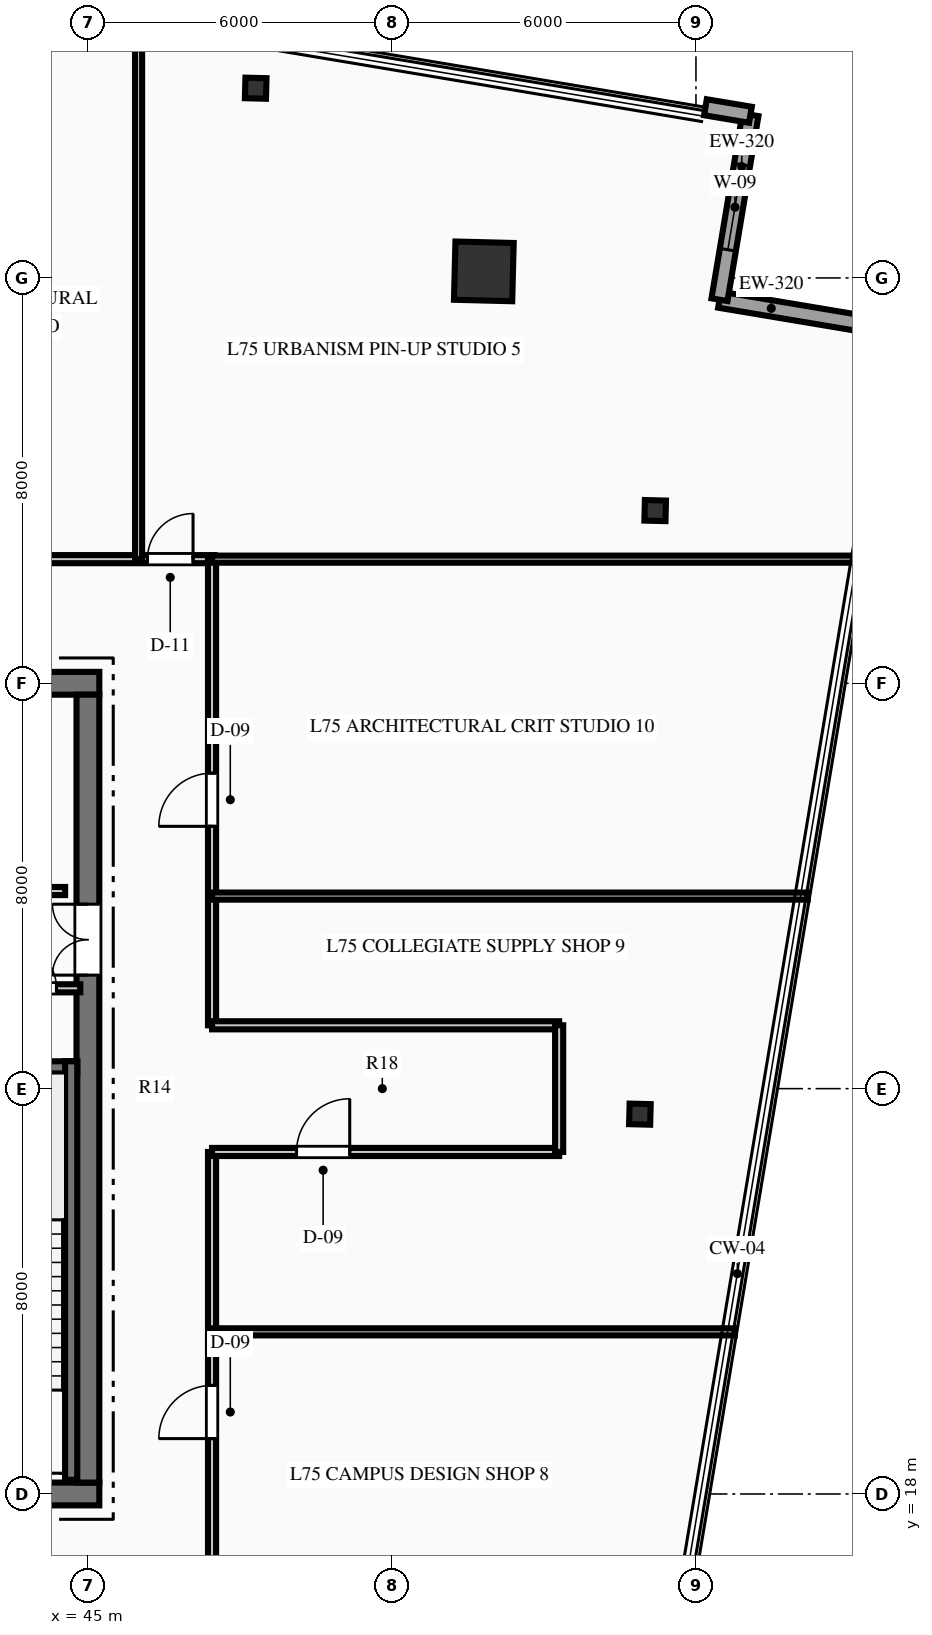
"""IFC4 building model, lengths in metres.
Left out: names, types, materials, properties, quantities, classifications, styles, units other than length and angle.
Written with IfcOpenShell. Run it as: python <this file> out.ifc"""

import sys

from ifc_helpers import new_model, si_unit, direction, frame, frame_2d, origin, origin_2d, place, context, subcontext, project, spatial, rectangle, hollow_rectangle, i_section, extrude, element, fill, save


model = new_model("IFC4")
c1 = context("Model", 3, precision=1e-05, world=origin(), true_north=direction((0.0, 1.0)))
c2 = subcontext(c1, "Body", "Model", "MODEL_VIEW")
j1 = project(units=[si_unit("LENGTHUNIT", "METRE"), si_unit("PLANEANGLEUNIT", "RADIAN")], contexts=[c1])
p1 = place(None, origin())
s1 = spatial("IfcSite", under=j1, at=p1, CompositionType="ELEMENT")
p2 = place(p1, origin())
s2 = spatial("IfcBuilding", under=s1, at=p2, CompositionType="ELEMENT")
p3 = place(p2, frame((0.0, 0.0, 298.2)))
s3 = spatial("IfcBuildingStorey", under=s2, at=p3, CompositionType="ELEMENT", Elevation=298.2)
p4 = place(p3, frame((26.775, 18.0, 0.0), z_axis=(0.0, 0.0, 1.0), x_axis=(1.0, 0.0, 0.0)))
e1 = element("IfcWall", 1, at=p4, inside=s3, PredefinedType="SHEAR", context=c2, shape_type="SweptSolid", body=[
    extrude(rectangle(XDim=18.45, YDim=0.45, at=frame_2d((9.225, 0.0))), origin(), (0.0, 0.0, 1.0), 4.5),
])
p5 = place(p4, frame((7.325, 0.0, 0.0)))
e2 = element("IfcOpeningElement", 2, at=p5, cuts=e1, PredefinedType="OPENING", context=c2, shape_type="SweptSolid", body=[
    extrude(rectangle(XDim=1.1, YDim=2.15, at=frame_2d((0.55, 1.075))), frame((0.0, 0.235, 0.0), z_axis=(0.0, -1.0, 0.0), x_axis=(1.0, 0.0, 0.0)), (0.0, 0.0, 1.0), 0.47),
])
p6 = place(p4, frame((10.025, 0.0, 0.0)))
e3 = element("IfcOpeningElement", 3, at=p6, cuts=e1, PredefinedType="OPENING", context=c2, shape_type="SweptSolid", body=[
    extrude(rectangle(XDim=1.1, YDim=2.15, at=frame_2d((0.55, 1.075))), frame((0.0, 0.235, 0.0), z_axis=(0.0, -1.0, 0.0), x_axis=(1.0, 0.0, 0.0)), (0.0, 0.0, 1.0), 0.47),
])
p7 = place(p3, frame((26.775, 34.0, 0.0), z_axis=(0.0, 0.0, 1.0), x_axis=(1.0, 0.0, 0.0)))
e4 = element("IfcWall", 4, at=p7, inside=s3, PredefinedType="SHEAR", context=c2, shape_type="SweptSolid", body=[
    extrude(rectangle(XDim=18.45, YDim=0.45, at=frame_2d((9.225, 0.0))), origin(), (0.0, 0.0, 1.0), 4.5),
])
p8 = place(p3, frame((45.0, 18.225, 0.0), z_axis=(0.0, 0.0, 1.0), x_axis=(0.0, 1.0, 0.0)))
e5 = element("IfcWall", 5, at=p8, inside=s3, PredefinedType="SHEAR", context=c2, shape_type="SweptSolid", body=[
    extrude(rectangle(XDim=15.55, YDim=0.45, at=frame_2d((7.775, 0.0))), origin(), (0.0, 0.0, 1.0), 4.5),
])
p9 = place(p8, frame((10.015, 0.0, 0.0)))
e6 = element("IfcOpeningElement", 6, at=p9, cuts=e5, PredefinedType="OPENING", context=c2, shape_type="SweptSolid", body=[
    extrude(rectangle(XDim=1.4, YDim=2.2, at=frame_2d((0.7, 1.1))), frame((0.0, 0.235, 0.0), z_axis=(0.0, -1.0, 0.0), x_axis=(1.0, 0.0, 0.0)), (0.0, 0.0, 1.0), 0.47),
])
p10 = place(p3, frame((40.81, 26.42, 0.0), z_axis=(0.0, 0.0, 1.0), x_axis=(1.0, 0.0, 0.0)))
e7 = element("IfcWall", 7, at=p10, inside=s3, PredefinedType="SHEAR", context=c2, shape_type="SweptSolid", body=[
    extrude(rectangle(XDim=3.98, YDim=0.24, at=frame_2d((1.99, 0.0))), origin(), (0.0, 0.0, 1.0), 4.5),
])
p11 = place(p3, frame((44.67, 18.28, 0.0), z_axis=(0.0, 0.0, 1.0), x_axis=(0.0, 1.0, 0.0)))
e8 = element("IfcWall", 8, at=p11, inside=s3, PredefinedType="SHEAR", context=c2, shape_type="SweptSolid", body=[
    extrude(rectangle(XDim=8.26, YDim=0.24, at=frame_2d((4.13, 0.0))), origin(), (0.0, 0.0, 1.0), 4.5),
])
p12 = place(p3, frame((52.813, 42.13, 0.0), z_axis=(0.0, 0.0, 1.0), x_axis=(0.025304572866, 0.999679788028, 0.0)))
e9 = element("IfcColumn", 9, at=p12, inside=s3, PredefinedType="COLUMN", context=c2, shape_type="SweptSolid", body=[
    extrude(hollow_rectangle(XDim=1.15, YDim=1.15, WallThickness=0.05, at=origin_2d()), origin(), (0.0, 0.0, 1.0), 4.5),
])
for number, where, z_axis, x_axis in (
    (10, (55.894, 25.496, 0.0), (0.0, 0.0, 1.0), (0.025, 1.0, 0.0)),
    (11, (56.195, 37.409, 0.0), (0.0, 0.0, 1.0), (0.025, 1.0, 0.0)),
    (12, (48.312, 45.745, 0.0), (0.0, 0.0, 1.0), (0.025, 1.0, 0.0)),
):
    element("IfcColumn", number, at=place(p3, frame(where, z_axis=z_axis, x_axis=x_axis)), inside=s3, PredefinedType="COLUMN", context=c2, shape_type="SweptSolid", body=[
        extrude(i_section(OverallWidth=0.406, OverallDepth=0.416, WebThickness=0.03, FlangeThickness=0.048, at=origin_2d()), origin(), (0.0, 0.0, 1.0), 4.5),
    ])
p13 = place(p3, frame((57.464, 41.571, 0.0), z_axis=(0.0, 0.0, 1.0), x_axis=(0.986288501332, -0.165030276432, 0.0)))
e13 = element("IfcWall", 13, at=p13, inside=s3, PredefinedType="STANDARD", context=c2, shape_type="SweptSolid", body=[
    extrude(rectangle(XDim=3.7, YDim=0.32, at=frame_2d((1.85, 0.0))), origin(), (0.0, 0.0, 1.0), 4.24),
])
p14 = place(p3, frame((58.075, 45.22, 0.0), z_axis=(0.0, 0.0, 1.0), x_axis=(-0.165019536794, -0.986290298278, 0.0)))
e14 = element("IfcWall", 14, at=p14, inside=s3, PredefinedType="STANDARD", context=c2, shape_type="SweptSolid", body=[
    extrude(rectangle(XDim=3.7, YDim=0.32, at=frame_2d((1.85, 0.0))), origin(), (0.0, 0.0, 1.0), 4.24),
])
p15 = place(p14, frame((1.0, 0.0, 0.75)))
e15 = element("IfcOpeningElement", 15, at=p15, cuts=e14, PredefinedType="OPENING", context=c2, shape_type="SweptSolid", body=[
    extrude(rectangle(XDim=1.7, YDim=2.5, at=frame_2d((0.85, 1.25))), frame((0.0, 0.17, 0.0), z_axis=(0.0, -1.0, 0.0), x_axis=(1.0, 0.0, 0.0)), (0.0, 0.0, 1.0), 0.34),
])
p16 = place(p3, frame((57.187, 45.369, 0.0), z_axis=(0.0, 0.0, 1.0), x_axis=(0.98630580598, -0.164926823442, 0.0)))
e16 = element("IfcWall", 16, at=p16, inside=s3, PredefinedType="STANDARD", context=c2, shape_type="SweptSolid", body=[
    extrude(rectangle(XDim=0.9, YDim=0.32, at=frame_2d((0.45, 0.0))), origin(), (0.0, 0.0, 1.0), 4.24),
])
p17 = place(p3, frame((40.8, 27.98, 0.0), z_axis=(0.0, 0.0, 1.0), x_axis=(1.0, 0.0, 0.0)))
e17 = element("IfcWall", 17, at=p17, inside=s3, PredefinedType="PARTITIONING", context=c2, shape_type="SweptSolid", body=[
    extrude(rectangle(XDim=4.05, YDim=0.16, at=frame_2d((2.025, 0.0))), origin(), (0.0, 0.0, 1.0), 4.24),
])
p18 = place(p17, frame((0.77, 0.0, 0.0)))
e18 = element("IfcOpeningElement", 18, at=p18, cuts=e17, PredefinedType="OPENING", context=c2, shape_type="SweptSolid", body=[
    extrude(rectangle(XDim=0.9, YDim=2.15, at=frame_2d((0.45, 1.075))), frame((0.0, 0.09, 0.0), z_axis=(0.0, -1.0, 0.0), x_axis=(1.0, 0.0, 0.0)), (0.0, 0.0, 1.0), 0.18),
])
p19 = place(p17, frame((2.68, 0.0, 0.0)))
e19 = element("IfcOpeningElement", 19, at=p19, cuts=e17, PredefinedType="OPENING", context=c2, shape_type="SweptSolid", body=[
    extrude(rectangle(XDim=0.9, YDim=2.15, at=frame_2d((0.45, 1.075))), frame((0.0, 0.09, 0.0), z_axis=(0.0, -1.0, 0.0), x_axis=(1.0, 0.0, 0.0)), (0.0, 0.0, 1.0), 0.18),
])
p20 = place(p3, frame((40.12, 29.9, 0.0), z_axis=(0.0, 0.0, 1.0), x_axis=(1.0, 0.0, 0.0)))
e20 = element("IfcWall", 20, at=p20, inside=s3, PredefinedType="PARTITIONING", context=c2, shape_type="SweptSolid", body=[
    extrude(rectangle(XDim=4.43, YDim=0.16, at=frame_2d((2.215, 0.0))), origin(), (0.0, 0.0, 1.0), 4.24),
])
p21 = place(p20, frame((1.755, 0.0, 0.0)))
e21 = element("IfcOpeningElement", 21, at=p21, cuts=e20, PredefinedType="OPENING", context=c2, shape_type="SweptSolid", body=[
    extrude(rectangle(XDim=0.95, YDim=2.15, at=frame_2d((0.475, 1.075))), frame((0.0, 0.09, 0.0), z_axis=(0.0, -1.0, 0.0), x_axis=(1.0, 0.0, 0.0)), (0.0, 0.0, 1.0), 0.18),
])
p22 = place(p3, frame((37.25, 36.45, 0.0), z_axis=(0.0, 0.0, 1.0), x_axis=(1.0, 0.0, 0.0)))
e22 = element("IfcWall", 22, at=p22, inside=s3, PredefinedType="PARTITIONING", context=c2, shape_type="SweptSolid", body=[
    extrude(rectangle(XDim=10.25, YDim=0.16, at=frame_2d((5.125, 0.0))), origin(), (0.0, 0.0, 1.0), 4.24),
])
p23 = place(p22, frame((4.365, 0.0, 0.0)))
e23 = element("IfcOpeningElement", 23, at=p23, cuts=e22, PredefinedType="OPENING", context=c2, shape_type="SweptSolid", body=[
    extrude(rectangle(XDim=1.05, YDim=2.15, at=frame_2d((0.525, 1.075))), frame((0.0, 0.09, 0.0), z_axis=(0.0, -1.0, 0.0), x_axis=(1.0, 0.0, 0.0)), (0.0, 0.0, 1.0), 0.18),
])
p24 = place(p22, frame((8.925, 0.0, 0.0)))
e24 = element("IfcOpeningElement", 24, at=p24, cuts=e22, PredefinedType="OPENING", context=c2, shape_type="SweptSolid", body=[
    extrude(rectangle(XDim=0.9, YDim=2.15, at=frame_2d((0.45, 1.075))), frame((0.0, 0.09, 0.0), z_axis=(0.0, -1.0, 0.0), x_axis=(1.0, 0.0, 0.0)), (0.0, 0.0, 1.0), 0.18),
])
p25 = place(p3, frame((47.45, 15.55, 0.0), z_axis=(0.0, 0.0, 1.0), x_axis=(0.0, 1.0, 0.0)))
e25 = element("IfcWall", 25, at=p25, inside=s3, PredefinedType="PARTITIONING", context=c2, shape_type="SweptSolid", body=[
    extrude(rectangle(XDim=9.2, YDim=0.16, at=frame_2d((4.6, 0.0))), origin(), (0.0, 0.0, 1.0), 4.24),
])
p26 = place(p25, frame((3.543, 0.0, 0.0)))
e26 = element("IfcOpeningElement", 26, at=p26, cuts=e25, PredefinedType="OPENING", context=c2, shape_type="SweptSolid", body=[
    extrude(rectangle(XDim=1.05, YDim=2.15, at=frame_2d((0.525, 1.075))), frame((0.0, 0.09, 0.0), z_axis=(0.0, -1.0, 0.0), x_axis=(1.0, 0.0, 0.0)), (0.0, 0.0, 1.0), 0.18),
])
p27 = place(p3, frame((47.45, 27.25, 0.0), z_axis=(0.0, 0.0, 1.0), x_axis=(0.0, 1.0, 0.0)))
e27 = element("IfcWall", 27, at=p27, inside=s3, PredefinedType="PARTITIONING", context=c2, shape_type="SweptSolid", body=[
    extrude(rectangle(XDim=9.2, YDim=0.16, at=frame_2d((4.6, 0.0))), origin(), (0.0, 0.0, 1.0), 4.24),
])
p28 = place(p27, frame((3.927, 0.0, 0.0)))
e28 = element("IfcOpeningElement", 28, at=p28, cuts=e27, PredefinedType="OPENING", context=c2, shape_type="SweptSolid", body=[
    extrude(rectangle(XDim=1.05, YDim=2.15, at=frame_2d((0.525, 1.075))), frame((0.0, 0.09, 0.0), z_axis=(0.0, -1.0, 0.0), x_axis=(1.0, 0.0, 0.0)), (0.0, 0.0, 1.0), 0.18),
])
p29 = place(p3, frame((47.45, 24.75, 0.0), z_axis=(0.0, 0.0, 1.0), x_axis=(1.0, 0.0, 0.0)))
e29 = element("IfcWall", 29, at=p29, inside=s3, PredefinedType="PARTITIONING", context=c2, shape_type="SweptSolid", body=[
    extrude(rectangle(XDim=6.85, YDim=0.16, at=frame_2d((3.425, 0.0))), origin(), (0.0, 0.0, 1.0), 4.24),
])
p30 = place(p29, frame((1.667, 0.0, 0.0)))
e30 = element("IfcOpeningElement", 30, at=p30, cuts=e29, PredefinedType="OPENING", context=c2, shape_type="SweptSolid", body=[
    extrude(rectangle(XDim=1.05, YDim=2.15, at=frame_2d((0.525, 1.075))), frame((0.0, 0.09, 0.0), z_axis=(0.0, -1.0, 0.0), x_axis=(1.0, 0.0, 0.0)), (0.0, 0.0, 1.0), 0.18),
])
p31 = place(p3, frame((47.45, 27.25, 0.0), z_axis=(0.0, 0.0, 1.0), x_axis=(1.0, 0.0, 0.0)))
e31 = element("IfcWall", 31, at=p31, inside=s3, PredefinedType="PARTITIONING", context=c2, shape_type="SweptSolid", body=[
    extrude(rectangle(XDim=6.85, YDim=0.16, at=frame_2d((3.425, 0.0))), origin(), (0.0, 0.0, 1.0), 4.24),
])
p32 = place(p3, frame((54.3, 24.75, 0.0), z_axis=(0.0, 0.0, 1.0), x_axis=(0.0, 1.0, 0.0)))
e32 = element("IfcWall", 32, at=p32, inside=s3, PredefinedType="PARTITIONING", context=c2, shape_type="SweptSolid", body=[
    extrude(rectangle(XDim=2.5, YDim=0.16, at=frame_2d((1.25, 0.0))), origin(), (0.0, 0.0, 1.0), 4.24),
])
p33 = place(p3, frame((47.45, 36.45, 0.0), z_axis=(0.0, 0.0, 1.0), x_axis=(1.0, 0.0, 0.0)))
e33 = element("IfcWall", 33, at=p33, inside=s3, PredefinedType="PARTITIONING", context=c2, shape_type="SweptSolid", body=[
    extrude(rectangle(XDim=12.868, YDim=0.14, at=frame_2d((6.434, 0.0))), origin(), (0.0, 0.0, 1.0), 3.829),
])
p34 = place(p3, frame((46.0, 36.45, 0.0), z_axis=(0.0, 0.0, 1.0), x_axis=(0.0, 1.0, 0.0)))
e34 = element("IfcWall", 34, at=p34, inside=s3, PredefinedType="PARTITIONING", context=c2, shape_type="SweptSolid", body=[
    extrude(rectangle(XDim=10.75, YDim=0.14, at=frame_2d((5.375, 0.0))), origin(), (0.0, 0.0, 1.0), 3.618),
])
p35 = place(p3, frame((47.45, 21.2, 0.0), z_axis=(0.0, 0.0, 1.0), x_axis=(1.0, 0.0, 0.0)))
e35 = element("IfcWall", 35, at=p35, inside=s3, PredefinedType="PARTITIONING", context=c2, shape_type="SweptSolid", body=[
    extrude(rectangle(XDim=10.316, YDim=0.14, at=frame_2d((5.158, 0.0))), origin(), (0.0, 0.0, 1.0), 4.24),
])
p36 = place(p3, frame((47.45, 29.8, 0.0), z_axis=(0.0, 0.0, 1.0), x_axis=(1.0, 0.0, 0.0)))
e36 = element("IfcWall", 36, at=p36, inside=s3, PredefinedType="PARTITIONING", context=c2, shape_type="SweptSolid", body=[
    extrude(rectangle(XDim=11.756, YDim=0.14, at=frame_2d((5.878, 0.0))), origin(), (0.0, 0.0, 1.0), 4.24),
])
p37 = place(p15, origin())
e37 = element("IfcWindow", 37, at=p37, inside=s3, PartitioningType="SINGLE_PANEL", PredefinedType="WINDOW", context=c2, shape_type="SweptSolid", body=[
    extrude(rectangle(XDim=1.7, YDim=2.5, at=frame_2d((0.85, 1.25))), frame((0.0, 0.03, 0.0), z_axis=(0.0, -1.0, 0.0), x_axis=(1.0, 0.0, 0.0)), (0.0, 0.0, 1.0), 0.06),
])
fill(e15, e37)
p38 = place(p19, origin())
e38 = element("IfcDoor", 38, at=p38, inside=s3, OperationType="SINGLE_SWING_LEFT", PredefinedType="DOOR", context=c2, shape_type="SweptSolid", body=[
    extrude(rectangle(XDim=0.9, YDim=2.15, at=frame_2d((0.45, 1.075))), frame((0.0, 0.025, 0.0), z_axis=(0.0, -1.0, 0.0), x_axis=(1.0, 0.0, 0.0)), (0.0, 0.0, 1.0), 0.05),
])
fill(e19, e38)
p39 = place(p9, origin())
e39 = element("IfcDoor", 39, at=p39, inside=s3, OperationType="DOUBLE_DOOR_SINGLE_SWING", PredefinedType="DOOR", context=c2, shape_type="SweptSolid", body=[
    extrude(rectangle(XDim=1.4, YDim=2.2, at=frame_2d((0.7, 1.1))), frame((0.0, 0.025, 0.0), z_axis=(0.0, -1.0, 0.0), x_axis=(1.0, 0.0, 0.0)), (0.0, 0.0, 1.0), 0.05),
])
fill(e6, e39)
p40 = place(p24, origin())
e40 = element("IfcDoor", 40, at=p40, inside=s3, OperationType="SINGLE_SWING_RIGHT", PredefinedType="DOOR", context=c2, shape_type="SweptSolid", body=[
    extrude(rectangle(XDim=0.9, YDim=2.15, at=frame_2d((0.45, 1.075))), frame((0.0, 0.025, 0.0), z_axis=(0.0, -1.0, 0.0), x_axis=(1.0, 0.0, 0.0)), (0.0, 0.0, 1.0), 0.05),
])
fill(e24, e40)
p41 = place(p26, origin())
e41 = element("IfcDoor", 41, at=p41, inside=s3, OperationType="SINGLE_SWING_LEFT", PredefinedType="DOOR", context=c2, shape_type="SweptSolid", body=[
    extrude(rectangle(XDim=1.05, YDim=2.15, at=frame_2d((0.525, 1.075))), frame((0.0, 0.025, 0.0), z_axis=(0.0, -1.0, 0.0), x_axis=(1.0, 0.0, 0.0)), (0.0, 0.0, 1.0), 0.05),
])
fill(e26, e41)
p42 = place(p30, origin())
e42 = element("IfcDoor", 42, at=p42, inside=s3, OperationType="SINGLE_SWING_RIGHT", PredefinedType="DOOR", context=c2, shape_type="SweptSolid", body=[
    extrude(rectangle(XDim=1.05, YDim=2.15, at=frame_2d((0.525, 1.075))), frame((0.0, 0.025, 0.0), z_axis=(0.0, -1.0, 0.0), x_axis=(1.0, 0.0, 0.0)), (0.0, 0.0, 1.0), 0.05),
])
fill(e30, e42)
p43 = place(p28, origin())
e43 = element("IfcDoor", 43, at=p43, inside=s3, OperationType="SINGLE_SWING_LEFT", PredefinedType="DOOR", context=c2, shape_type="SweptSolid", body=[
    extrude(rectangle(XDim=1.05, YDim=2.15, at=frame_2d((0.525, 1.075))), frame((0.0, 0.025, 0.0), z_axis=(0.0, -1.0, 0.0), x_axis=(1.0, 0.0, 0.0)), (0.0, 0.0, 1.0), 0.05),
])
fill(e28, e43)
save(model, sys.argv[1])
